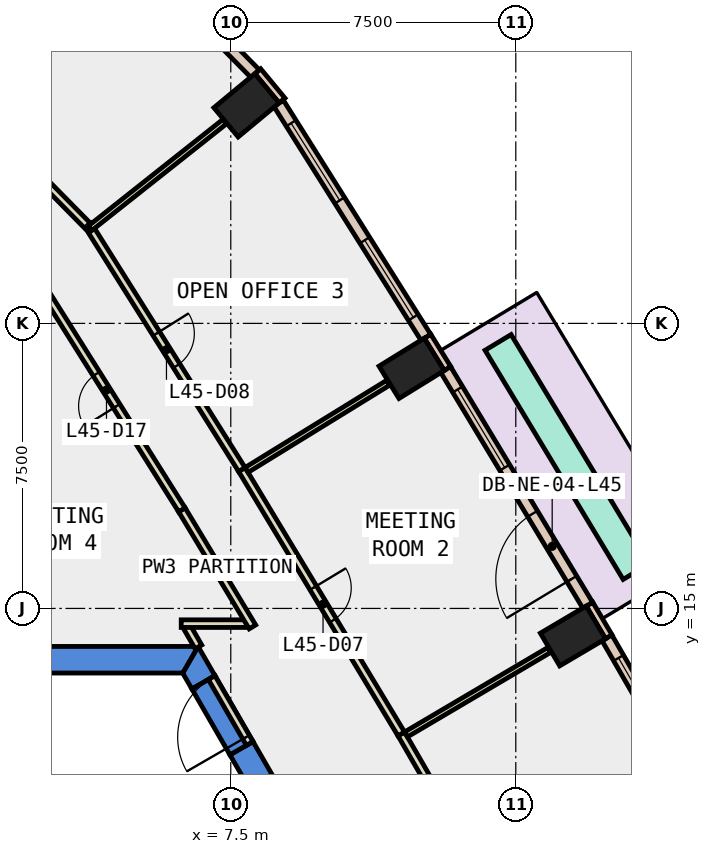
"""IFC4 building model, lengths in metres.
Left out: names, types, materials, properties, quantities, classifications, styles, units other than length and angle.
Written with IfcOpenShell. Run it as: python <this file> out.ifc"""

import sys

from ifc_helpers import new_model, si_unit, direction, frame, frame_2d, origin, origin_2d, place, context, subcontext, project, spatial, polyline, rectangle, outline, extrude, element, fill, save


model = new_model("IFC4")
c1 = context("Model", 3, precision=1e-05, world=origin(), true_north=direction((0.0, 1.0)))
c2 = subcontext(c1, "Body", "Model", "MODEL_VIEW")
j1 = project(units=[si_unit("LENGTHUNIT", "METRE"), si_unit("PLANEANGLEUNIT", "RADIAN")], contexts=[c1])
p1 = place(None, origin())
s1 = spatial("IfcSite", under=j1, at=p1, CompositionType="ELEMENT")
p2 = place(p1, origin())
s2 = spatial("IfcBuilding", under=s1, at=p2, CompositionType="ELEMENT")
p3 = place(p2, frame((0.0, 0.0, 202.4)))
s3 = spatial("IfcBuildingStorey", under=s2, at=p3, CompositionType="ELEMENT", Elevation=202.4)
for number, where, z_axis, x_axis in (
    (1, (16.504, 14.275, -0.4), (0.0, 0.0, 1.0), (-0.509, 0.861, 0.0)),
    (2, (12.259, 21.317, -0.4), (0.0, 0.0, 1.0), (-0.525, 0.851, 0.0)),
    (3, (7.914, 28.238, -0.4), (0.0, 0.0, 1.0), (-0.639, 0.769, 0.0)),
):
    element("IfcColumn", number, at=place(p3, frame(where, z_axis=z_axis, x_axis=x_axis)), inside=s3, PredefinedType="COLUMN", context=c2, shape_type="SweptSolid", body=[
        extrude(rectangle(XDim=1.0, YDim=1.4, at=origin_2d()), origin(), (0.0, 0.0, 1.0), 4.2),
    ])
p4 = place(p3, frame((0.0, 0.0, -0.4)))
e4 = element("IfcWall", 4, at=p4, inside=s3, PredefinedType="SHEAR", context=c2, shape_type="SweptSolid", body=[
    extrude(outline(polyline([(8.084, 11.498), (7.478, 11.148), (12.471, 2.5), (13.279, 2.5), (8.084, 11.498)])), origin(), (0.0, 0.0, 1.0), 4.2),
])
p5 = place(p3, frame((0.0, 0.0, -0.4)))
e5 = element("IfcWall", 5, at=p5, inside=s3, PredefinedType="SHEAR", context=c2, shape_type="SweptSolid", body=[
    extrude(outline(polyline([(6.478, 12.88), (7.084, 13.23), (6.64, 14.0), (6.235, 13.3), (6.478, 12.88)])), origin(), (0.0, 0.0, 1.0), 4.2),
])
p6 = place(p3, frame((0.0, 0.0, 3.6)))
e6 = element("IfcWall", 6, at=p6, inside=s3, PredefinedType="SHEAR", context=c2, shape_type="SweptSolid", body=[
    extrude(outline(polyline([(7.084, 13.23), (6.478, 12.88), (7.478, 11.148), (8.084, 11.498), (7.084, 13.23)])), origin(), (0.0, 0.0, 1.0), 0.2),
])
p7 = place(p3, frame((0.0, 0.0, -0.4)))
e7 = element("IfcWall", 7, at=p7, inside=s3, PredefinedType="SHEAR", context=c2, shape_type="SweptSolid", body=[
    extrude(outline(polyline([(6.64, 14.0), (-6.64, 14.0), (-6.235, 13.3), (6.235, 13.3), (6.64, 14.0)])), origin(), (0.0, 0.0, 1.0), 4.2),
])
p8 = place(p3, frame((17.447, 14.252, 0.0), z_axis=(0.0, 0.0, 1.0), x_axis=(-0.508161541526, 0.861261776531, 0.0)))
e8 = element("IfcWall", 8, at=p8, inside=s3, PredefinedType="STANDARD", context=c2, shape_type="SweptSolid", body=[
    extrude(rectangle(XDim=1.0, YDim=0.2, at=frame_2d((0.5, 0.0))), origin(), (0.0, 0.0, 1.0), 3.8),
])
p9 = place(p3, frame((13.203, 21.312, 0.0), z_axis=(0.0, 0.0, 1.0), x_axis=(-0.525648735675, 0.850701714282, 0.0)))
e9 = element("IfcWall", 9, at=p9, inside=s3, PredefinedType="STANDARD", context=c2, shape_type="SweptSolid", body=[
    extrude(rectangle(XDim=1.0, YDim=0.2, at=frame_2d((0.5, 0.0))), origin(), (0.0, 0.0, 1.0), 3.8),
])
p10 = place(p3, frame((8.849, 28.364, 0.0), z_axis=(0.0, 0.0, 1.0), x_axis=(-0.638117112481, 0.769939316283, 0.0)))
e10 = element("IfcWall", 10, at=p10, inside=s3, PredefinedType="STANDARD", context=c2, shape_type="SweptSolid", body=[
    extrude(rectangle(XDim=1.0, YDim=0.2, at=frame_2d((0.5, 0.0))), origin(), (0.0, 0.0, 1.0), 3.8),
])
p11 = place(p3, frame((21.019, 7.955, 0.0), z_axis=(0.0, 0.0, 1.0), x_axis=(-0.500012402131, 0.866018243292, 0.0)))
e11 = element("IfcWall", 11, at=p11, inside=s3, PredefinedType="STANDARD", context=c2, shape_type="SweptSolid", body=[
    extrude(rectangle(XDim=7.24, YDim=0.3, at=frame_2d((3.62, 0.0))), origin(), (0.0, 0.0, 1.0), 3.8),
])
p12 = place(p11, frame((0.61, 0.0, 0.9)))
e12 = element("IfcOpeningElement", 12, at=p12, cuts=e11, PredefinedType="OPENING", context=c2, shape_type="SweptSolid", body=[
    extrude(rectangle(XDim=2.4, YDim=2.6, at=frame_2d((1.2, 1.3))), frame((0.0, 0.16, 0.0), z_axis=(0.0, -1.0, 0.0), x_axis=(1.0, 0.0, 0.0)), (0.0, 0.0, 1.0), 0.32),
])
p13 = place(p11, frame((4.23, 0.0, 0.9)))
e13 = element("IfcOpeningElement", 13, at=p13, cuts=e11, PredefinedType="OPENING", context=c2, shape_type="SweptSolid", body=[
    extrude(rectangle(XDim=2.4, YDim=2.6, at=frame_2d((1.2, 1.3))), frame((0.0, 0.16, 0.0), z_axis=(0.0, -1.0, 0.0), x_axis=(1.0, 0.0, 0.0)), (0.0, 0.0, 1.0), 0.32),
])
p14 = place(p3, frame((16.892, 15.084, 0.0), z_axis=(0.0, 0.0, 1.0), x_axis=(-0.516230553484, 0.856449657394, 0.0)))
e14 = element("IfcWall", 14, at=p14, inside=s3, PredefinedType="STANDARD", context=c2, shape_type="SweptSolid", body=[
    extrude(rectangle(XDim=7.239, YDim=0.3, at=frame_2d((3.62, 0.0))), origin(), (0.0, 0.0, 1.0), 3.8),
])
p15 = place(p14, frame((0.81, 0.0, 0.0)))
e15 = element("IfcOpeningElement", 15, at=p15, cuts=e14, PredefinedType="OPENING", context=c2, shape_type="SweptSolid", body=[
    extrude(rectangle(XDim=2.0, YDim=2.4, at=frame_2d((1.0, 1.2))), frame((0.0, 0.16, 0.0), z_axis=(0.0, -1.0, 0.0), x_axis=(1.0, 0.0, 0.0)), (0.0, 0.0, 1.0), 0.32),
])
p16 = place(p14, frame((4.229, 0.0, 0.9)))
e16 = element("IfcOpeningElement", 16, at=p16, cuts=e14, PredefinedType="OPENING", context=c2, shape_type="SweptSolid", body=[
    extrude(rectangle(XDim=2.4, YDim=2.6, at=frame_2d((1.2, 1.3))), frame((0.0, 0.16, 0.0), z_axis=(0.0, -1.0, 0.0), x_axis=(1.0, 0.0, 0.0)), (0.0, 0.0, 1.0), 0.32),
])
p17 = place(p3, frame((12.632, 22.134, 0.0), z_axis=(0.0, 0.0, 1.0), x_axis=(-0.532522107002, 0.84641609481, 0.0)))
e17 = element("IfcWall", 17, at=p17, inside=s3, PredefinedType="STANDARD", context=c2, shape_type="SweptSolid", body=[
    extrude(rectangle(XDim=7.273, YDim=0.3, at=frame_2d((3.636, 0.0))), origin(), (0.0, 0.0, 1.0), 3.8),
])
p18 = place(p17, frame((0.618, 0.0, 0.9)))
e18 = element("IfcOpeningElement", 18, at=p18, cuts=e17, PredefinedType="OPENING", context=c2, shape_type="SweptSolid", body=[
    extrude(rectangle(XDim=2.4, YDim=2.6, at=frame_2d((1.2, 1.3))), frame((0.0, 0.16, 0.0), z_axis=(0.0, -1.0, 0.0), x_axis=(1.0, 0.0, 0.0)), (0.0, 0.0, 1.0), 0.32),
])
p19 = place(p17, frame((4.255, 0.0, 0.9)))
e19 = element("IfcOpeningElement", 19, at=p19, cuts=e17, PredefinedType="OPENING", context=c2, shape_type="SweptSolid", body=[
    extrude(rectangle(XDim=2.4, YDim=2.6, at=frame_2d((1.2, 1.3))), frame((0.0, 0.16, 0.0), z_axis=(0.0, -1.0, 0.0), x_axis=(1.0, 0.0, 0.0)), (0.0, 0.0, 1.0), 0.32),
])
p20 = place(p3, frame((8.139, 29.073, 0.0), z_axis=(0.0, 0.0, 1.0), x_axis=(-0.70209072612, 0.712087503258, 0.0)))
e20 = element("IfcWall", 20, at=p20, inside=s3, PredefinedType="STANDARD", context=c2, shape_type="SweptSolid", body=[
    extrude(rectangle(XDim=4.005, YDim=0.3, at=frame_2d((2.002, 0.0))), origin(), (0.0, 0.0, 1.0), 3.8),
])
p21 = place(p20, frame((1.303, 0.0, 0.9)))
e21 = element("IfcOpeningElement", 21, at=p21, cuts=e20, PredefinedType="OPENING", context=c2, shape_type="SweptSolid", body=[
    extrude(rectangle(XDim=1.4, YDim=2.6, at=frame_2d((0.7, 1.3))), frame((0.0, 0.16, 0.0), z_axis=(0.0, -1.0, 0.0), x_axis=(1.0, 0.0, 0.0)), (0.0, 0.0, 1.0), 0.32),
])
p22 = place(p3, frame((18.168, 15.97, 0.0), z_axis=(0.0, 0.0, 1.0), x_axis=(-0.516228760394, 0.856450738188, 0.0)))
e22 = element("IfcWall", 22, at=p22, inside=s3, PredefinedType="STANDARD", context=c2, shape_type="SweptSolid", body=[
    extrude(rectangle(XDim=7.04, YDim=0.8, at=frame_2d((3.52, 0.0))), origin(), (0.0, 0.0, 1.0), 0.8),
])
p23 = place(p3, frame((6.649, 13.988, 0.0), z_axis=(0.0, 0.0, 1.0), x_axis=(-0.499908430952, 0.866078264744, 0.0)))
e23 = element("IfcWall", 23, at=p23, inside=s3, PredefinedType="PARTITIONING", context=c2, shape_type="SweptSolid", body=[
    extrude(rectangle(XDim=0.606, YDim=0.2, at=frame_2d((0.303, 0.0))), origin(), (0.0, 0.0, 1.0), 3.8),
])
p24 = place(p3, frame((6.196, 14.6, 0.0), z_axis=(0.0, 0.0, 1.0), x_axis=(1.0, 0.0, 0.0)))
e24 = element("IfcWall", 24, at=p24, inside=s3, PredefinedType="PARTITIONING", context=c2, shape_type="SweptSolid", body=[
    extrude(rectangle(XDim=1.722, YDim=0.2, at=frame_2d((0.861, 0.0))), origin(), (0.0, 0.0, 1.0), 3.8),
])
p25 = place(p3, frame((8.07, 14.514, 0.0), z_axis=(0.0, 0.0, 1.0), x_axis=(-0.51624118739, 0.856443247648, 0.0)))
e25 = element("IfcWall", 25, at=p25, inside=s3, PredefinedType="PARTITIONING", context=c2, shape_type="SweptSolid", body=[
    extrude(rectangle(XDim=3.597, YDim=0.2, at=frame_2d((1.799, 0.0))), origin(), (0.0, 0.0, 1.0), 3.8),
])
p26 = place(p3, frame((6.213, 17.595, 0.0), z_axis=(0.0, 0.0, 1.0), x_axis=(-0.532527247309, 0.846412860768, 0.0)))
e26 = element("IfcWall", 26, at=p26, inside=s3, PredefinedType="PARTITIONING", context=c2, shape_type="SweptSolid", body=[
    extrude(rectangle(XDim=7.449, YDim=0.2, at=frame_2d((3.725, 0.0))), origin(), (0.0, 0.0, 1.0), 3.8),
])
p27 = place(p26, frame((3.225, 0.0, 0.0)))
e27 = element("IfcOpeningElement", 27, at=p27, cuts=e26, PredefinedType="OPENING", context=c2, shape_type="SweptSolid", body=[
    extrude(rectangle(XDim=1.0, YDim=2.1, at=frame_2d((0.5, 1.05))), frame((0.0, 0.11, 0.0), z_axis=(0.0, -1.0, 0.0), x_axis=(1.0, 0.0, 0.0)), (0.0, 0.0, 1.0), 0.22),
])
p28 = place(p3, frame((11.987, 11.698, 0.0), z_axis=(0.0, 0.0, 1.0), x_axis=(0.500075329254, -0.865981908051, 0.0)))
e28 = element("IfcWall", 28, at=p28, inside=s3, PredefinedType="PARTITIONING", context=c2, shape_type="SweptSolid", body=[
    extrude(rectangle(XDim=8.125, YDim=0.2, at=frame_2d((4.062, 0.0))), origin(), (0.0, 0.0, 1.0), 3.8),
])
p29 = place(p28, frame((3.637, 0.0, 0.0)))
e29 = element("IfcOpeningElement", 29, at=p29, cuts=e28, PredefinedType="OPENING", context=c2, shape_type="SweptSolid", body=[
    extrude(rectangle(XDim=1.0, YDim=2.1, at=frame_2d((0.5, 1.05))), frame((0.0, 0.11, 0.0), z_axis=(0.0, -1.0, 0.0), x_axis=(1.0, 0.0, 0.0)), (0.0, 0.0, 1.0), 0.22),
])
p30 = place(p3, frame((7.792, 18.655, 0.0), z_axis=(0.0, 0.0, 1.0), x_axis=(0.516293428925, -0.856411755669, 0.0)))
e30 = element("IfcWall", 30, at=p30, inside=s3, PredefinedType="PARTITIONING", context=c2, shape_type="SweptSolid", body=[
    extrude(rectangle(XDim=8.124, YDim=0.2, at=frame_2d((4.062, 0.0))), origin(), (0.0, 0.0, 1.0), 3.8),
])
p31 = place(p30, frame((3.637, 0.0, 0.0)))
e31 = element("IfcOpeningElement", 31, at=p31, cuts=e30, PredefinedType="OPENING", context=c2, shape_type="SweptSolid", body=[
    extrude(rectangle(XDim=1.0, YDim=2.1, at=frame_2d((0.5, 1.05))), frame((0.0, 0.11, 0.0), z_axis=(0.0, -1.0, 0.0), x_axis=(1.0, 0.0, 0.0)), (0.0, 0.0, 1.0), 0.22),
])
p32 = place(p3, frame((3.744, 25.087, 0.0), z_axis=(0.0, 0.0, 1.0), x_axis=(0.532569549341, -0.846386244639, 0.0)))
e32 = element("IfcWall", 32, at=p32, inside=s3, PredefinedType="PARTITIONING", context=c2, shape_type="SweptSolid", body=[
    extrude(rectangle(XDim=7.599, YDim=0.2, at=frame_2d((3.8, 0.0))), origin(), (0.0, 0.0, 1.0), 3.8),
])
p33 = place(p32, frame((3.375, 0.0, 0.0)))
e33 = element("IfcOpeningElement", 33, at=p33, cuts=e32, PredefinedType="OPENING", context=c2, shape_type="SweptSolid", body=[
    extrude(rectangle(XDim=1.0, YDim=2.1, at=frame_2d((0.5, 1.05))), frame((0.0, 0.11, 0.0), z_axis=(0.0, -1.0, 0.0), x_axis=(1.0, 0.0, 0.0)), (0.0, 0.0, 1.0), 0.22),
])
p34 = place(p3, frame((1.773, 27.056, 0.0), z_axis=(0.0, 0.0, 1.0), x_axis=(0.702089218366, -0.712088989842, 0.0)))
e34 = element("IfcWall", 34, at=p34, inside=s3, PredefinedType="PARTITIONING", context=c2, shape_type="SweptSolid", body=[
    extrude(rectangle(XDim=2.783, YDim=0.2, at=frame_2d((1.392, 0.0))), origin(), (0.0, 0.0, 1.0), 3.8),
])
p35 = place(p3, frame((12.111, 11.684, 0.0), z_axis=(0.0, 0.0, 1.0), x_axis=(0.861290233547, 0.508113307833, 0.0)))
e35 = element("IfcWall", 35, at=p35, inside=s3, PredefinedType="PARTITIONING", context=c2, shape_type="SweptSolid", body=[
    extrude(rectangle(XDim=4.381, YDim=0.15, at=frame_2d((2.19, 0.0))), origin(), (0.0, 0.0, 1.0), 3.8),
])
p36 = place(p3, frame((7.916, 18.644, 0.0), z_axis=(0.0, 0.0, 1.0), x_axis=(0.851543444049, 0.524284047914, 0.0)))
e36 = element("IfcWall", 36, at=p36, inside=s3, PredefinedType="PARTITIONING", context=c2, shape_type="SweptSolid", body=[
    extrude(rectangle(XDim=4.379, YDim=0.15, at=frame_2d((2.189, 0.0))), origin(), (0.0, 0.0, 1.0), 3.8),
])
p37 = place(p3, frame((3.797, 25.003, 0.0), z_axis=(0.0, 0.0, 1.0), x_axis=(0.783893371826, 0.620895467536, 0.0)))
e37 = element("IfcWall", 37, at=p37, inside=s3, PredefinedType="PARTITIONING", context=c2, shape_type="SweptSolid", body=[
    extrude(rectangle(XDim=4.514, YDim=0.15, at=frame_2d((2.257, 0.0))), origin(), (0.0, 0.0, 1.0), 3.8),
])
p38 = place(p3, frame((7.997, 11.448, 0.0), z_axis=(0.0, 0.0, 1.0), x_axis=(-0.50002537861, 0.866010750942, 0.0)))
e38 = element("IfcWall", 38, at=p38, inside=s3, PredefinedType="PARTITIONING", context=c2, shape_type="SweptSolid", body=[
    extrude(rectangle(XDim=2.0, YDim=0.2, at=frame_2d((1.0, 0.0))), origin(), (0.0, 0.0, 1.0), 2.4),
])
p39 = place(p38, frame((0.19, 0.0, 0.0)))
e39 = element("IfcOpeningElement", 39, at=p39, cuts=e38, PredefinedType="OPENING", context=c2, shape_type="SweptSolid", body=[
    extrude(rectangle(XDim=1.8, YDim=2.1, at=frame_2d((0.9, 1.05))), frame((0.0, 0.11, 0.0), z_axis=(0.0, -1.0, 0.0), x_axis=(1.0, 0.0, 0.0)), (0.0, 0.0, 1.0), 0.22),
])
p40 = place(p13, origin())
e40 = element("IfcWindow", 40, at=p40, inside=s3, PartitioningType="SINGLE_PANEL", PredefinedType="WINDOW", context=c2, shape_type="SweptSolid", body=[
    extrude(rectangle(XDim=2.4, YDim=2.6, at=frame_2d((1.2, 1.3))), frame((0.0, 0.03, 0.0), z_axis=(0.0, -1.0, 0.0), x_axis=(1.0, 0.0, 0.0)), (0.0, 0.0, 1.0), 0.06),
])
fill(e13, e40)
p41 = place(p15, origin())
e41 = element("IfcDoor", 41, at=p41, inside=s3, OperationType="SLIDING_TO_LEFT", PredefinedType="DOOR", context=c2, shape_type="SweptSolid", body=[
    extrude(rectangle(XDim=2.0, YDim=2.4, at=frame_2d((1.0, 1.2))), frame((0.0, 0.025, 0.0), z_axis=(0.0, -1.0, 0.0), x_axis=(1.0, 0.0, 0.0)), (0.0, 0.0, 1.0), 0.05),
])
fill(e15, e41)
p42 = place(p16, origin())
e42 = element("IfcWindow", 42, at=p42, inside=s3, PartitioningType="SINGLE_PANEL", PredefinedType="WINDOW", context=c2, shape_type="SweptSolid", body=[
    extrude(rectangle(XDim=2.4, YDim=2.6, at=frame_2d((1.2, 1.3))), frame((0.0, 0.03, 0.0), z_axis=(0.0, -1.0, 0.0), x_axis=(1.0, 0.0, 0.0)), (0.0, 0.0, 1.0), 0.06),
])
fill(e16, e42)
p43 = place(p18, origin())
e43 = element("IfcWindow", 43, at=p43, inside=s3, PartitioningType="SINGLE_PANEL", PredefinedType="WINDOW", context=c2, shape_type="SweptSolid", body=[
    extrude(rectangle(XDim=2.4, YDim=2.6, at=frame_2d((1.2, 1.3))), frame((0.0, 0.03, 0.0), z_axis=(0.0, -1.0, 0.0), x_axis=(1.0, 0.0, 0.0)), (0.0, 0.0, 1.0), 0.06),
])
fill(e18, e43)
p44 = place(p19, origin())
e44 = element("IfcWindow", 44, at=p44, inside=s3, PartitioningType="SINGLE_PANEL", PredefinedType="WINDOW", context=c2, shape_type="SweptSolid", body=[
    extrude(rectangle(XDim=2.4, YDim=2.6, at=frame_2d((1.2, 1.3))), frame((0.0, 0.03, 0.0), z_axis=(0.0, -1.0, 0.0), x_axis=(1.0, 0.0, 0.0)), (0.0, 0.0, 1.0), 0.06),
])
fill(e19, e44)
p45 = place(p31, origin())
e45 = element("IfcDoor", 45, at=p45, inside=s3, OperationType="SINGLE_SWING_RIGHT", PredefinedType="DOOR", context=c2, shape_type="SweptSolid", body=[
    extrude(rectangle(XDim=1.0, YDim=2.1, at=frame_2d((0.5, 1.05))), frame((0.0, 0.025, 0.0), z_axis=(0.0, -1.0, 0.0), x_axis=(1.0, 0.0, 0.0)), (0.0, 0.0, 1.0), 0.05),
])
fill(e31, e45)
p46 = place(p33, origin())
e46 = element("IfcDoor", 46, at=p46, inside=s3, OperationType="SINGLE_SWING_LEFT", PredefinedType="DOOR", context=c2, shape_type="SweptSolid", body=[
    extrude(rectangle(XDim=1.0, YDim=2.1, at=frame_2d((0.5, 1.05))), frame((0.0, 0.025, 0.0), z_axis=(0.0, -1.0, 0.0), x_axis=(1.0, 0.0, 0.0)), (0.0, 0.0, 1.0), 0.05),
])
fill(e33, e46)
p47 = place(p27, origin())
e47 = element("IfcDoor", 47, at=p47, inside=s3, OperationType="SINGLE_SWING_LEFT", PredefinedType="DOOR", context=c2, shape_type="SweptSolid", body=[
    extrude(rectangle(XDim=1.0, YDim=2.1, at=frame_2d((0.5, 1.05))), frame((0.0, 0.025, 0.0), z_axis=(0.0, -1.0, 0.0), x_axis=(1.0, 0.0, 0.0)), (0.0, 0.0, 1.0), 0.05),
])
fill(e27, e47)
p48 = place(p39, origin())
e48 = element("IfcDoor", 48, at=p48, inside=s3, OperationType="DOUBLE_DOOR_SINGLE_SWING", PredefinedType="DOOR", context=c2, shape_type="SweptSolid", body=[
    extrude(rectangle(XDim=1.8, YDim=2.1, at=frame_2d((0.9, 1.05))), frame((0.0, 0.025, 0.0), z_axis=(0.0, -1.0, 0.0), x_axis=(1.0, 0.0, 0.0)), (0.0, 0.0, 1.0), 0.05),
])
fill(e39, e48)
save(model, sys.argv[1])
